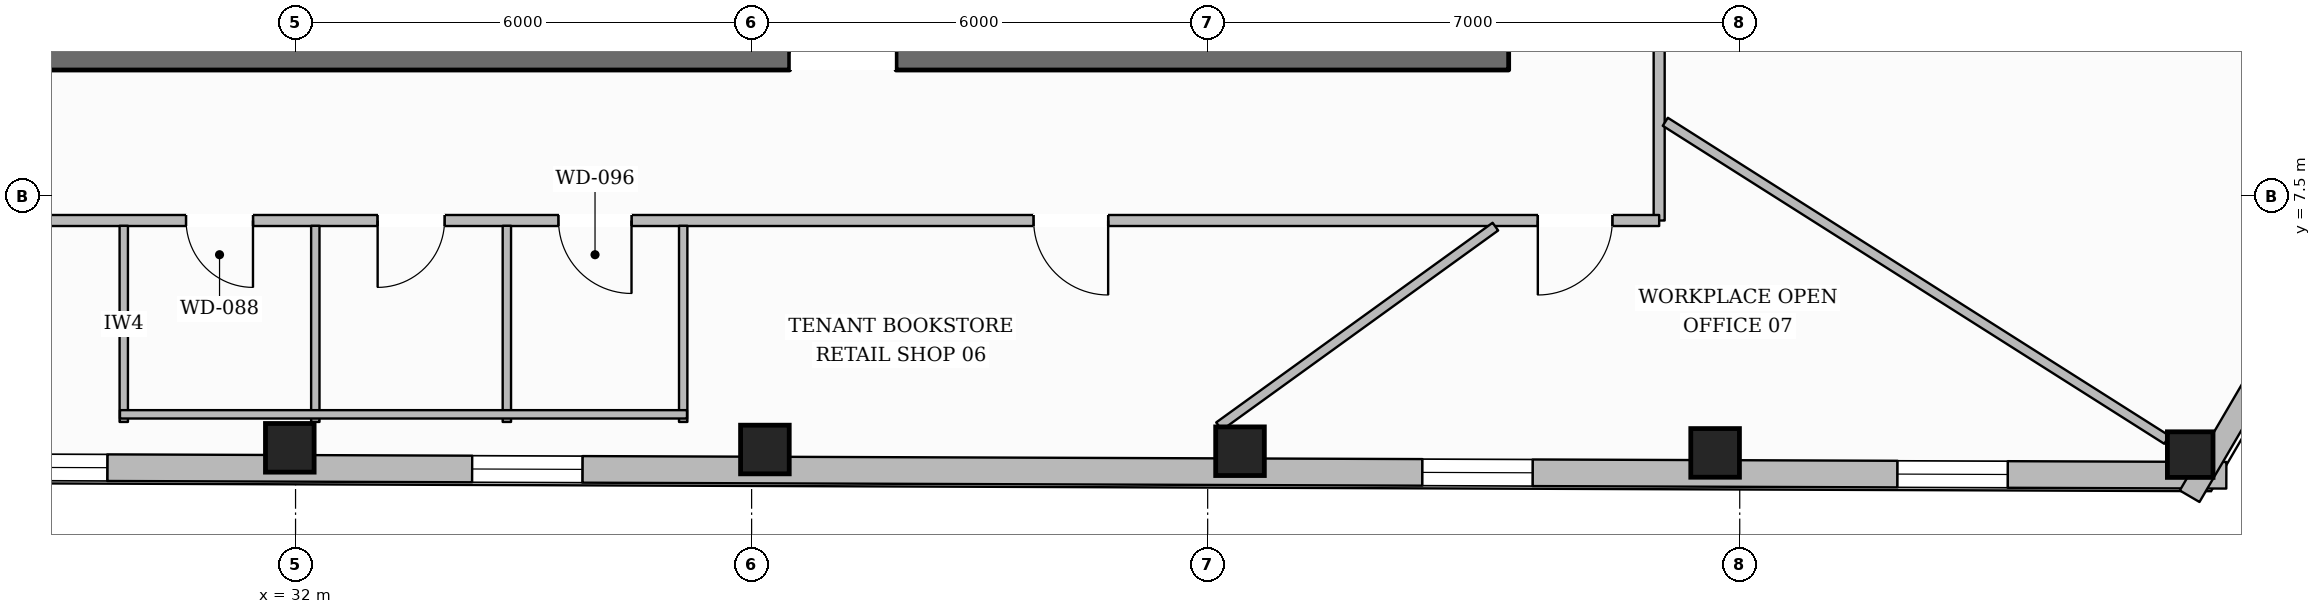
"""IFC4 building model, lengths in metres.
Left out: names, types, materials, properties, quantities, classifications, styles, units other than length and angle.
Written with IfcOpenShell. Run it as: python <this file> out.ifc"""

import sys

from ifc_helpers import new_model, si_unit, direction, frame, frame_2d, origin, origin_2d, place, context, subcontext, project, spatial, rectangle, hollow_rectangle, extrude, element, fill, save


model = new_model("IFC4")
c1 = context("Model", 3, precision=1e-05, world=origin(), true_north=direction((0.0, 1.0)))
c2 = subcontext(c1, "Body", "Model", "MODEL_VIEW")
j1 = project(units=[si_unit("LENGTHUNIT", "METRE"), si_unit("PLANEANGLEUNIT", "RADIAN")], contexts=[c1])
p1 = place(None, origin())
s1 = spatial("IfcSite", under=j1, at=p1, CompositionType="ELEMENT")
p2 = place(p1, origin())
s2 = spatial("IfcBuilding", under=s1, at=p2, CompositionType="ELEMENT")
p3 = place(p2, frame((0.0, 0.0, 199.65)))
s3 = spatial("IfcBuildingStorey", under=s2, at=p3, CompositionType="ELEMENT", Elevation=199.65)
p4 = place(p3, frame((28.04, 9.38, 0.0), z_axis=(0.0, 0.0, 1.0), x_axis=(1.0, 0.0, 0.0)))
e1 = element("IfcWall", 1, at=p4, inside=s3, PredefinedType="SOLIDWALL", context=c2, shape_type="SweptSolid", body=[
    extrude(rectangle(XDim=19.92, YDim=0.44, at=frame_2d((9.96, 0.0))), origin(), (0.0, 0.0, 1.0), 3.6),
])
p5 = place(p4, frame((10.46, 0.0, 0.0)))
e2 = element("IfcOpeningElement", 2, at=p5, cuts=e1, PredefinedType="OPENING", context=c2, shape_type="SweptSolid", body=[
    extrude(rectangle(XDim=1.4, YDim=2.2, at=frame_2d((0.7, 1.1))), frame((0.0, 0.23, 0.0), z_axis=(0.0, -1.0, 0.0), x_axis=(1.0, 0.0, 0.0)), (0.0, 0.0, 1.0), 0.46),
])
for number, where, z_axis, x_axis in (
    (3, (31.924, 4.189, 0.0), (0.0, 0.0, 1.0), (1.0, 0.0, 0.0)),
    (4, (38.175, 4.167, 0.0), (0.0, 0.0, 1.0), (1.0, 0.0, 0.0)),
    (5, (44.426, 4.145, 0.0), (0.0, 0.0, 1.0), (1.0, 0.0, 0.0)),
    (6, (50.676, 4.123, 0.0), (0.0, 0.0, 1.0), (1.0, 0.0, 0.0)),
):
    element("IfcColumn", number, at=place(p3, frame(where, z_axis=z_axis, x_axis=x_axis)), inside=s3, PredefinedType="COLUMN", context=c2, shape_type="SweptSolid", body=[
        extrude(hollow_rectangle(XDim=0.64, YDim=0.64, WallThickness=0.028, at=origin_2d()), origin(), (0.0, 0.0, 1.0), 3.6),
    ])
p6 = place(p3, frame((56.927, 4.1, 0.0), z_axis=(0.0, 0.0, 1.0), x_axis=(1.0, 0.0, 0.0)))
e7 = element("IfcColumn", 7, at=p6, inside=s3, PredefinedType="COLUMN", context=c2, shape_type="SweptSolid", body=[
    extrude(hollow_rectangle(XDim=0.6, YDim=0.6, WallThickness=0.028, at=origin_2d()), origin(), (0.0, 0.0, 1.0), 3.6),
])
p7 = place(p3, frame((57.402, 3.828, 0.0), z_axis=(0.0, 0.0, 1.0), x_axis=(-0.999993611248, 0.003574557642, 0.0)))
e8 = element("IfcWall", 8, at=p7, inside=s3, PredefinedType="STANDARD", context=c2, shape_type="SweptSolid", body=[
    extrude(rectangle(XDim=38.453, YDim=0.35, at=frame_2d((19.226, 0.0))), origin(), (0.0, 0.0, 1.0), 3.132),
])
p8 = place(p7, frame((34.129, 0.0, 0.65)))
e9 = element("IfcOpeningElement", 9, at=p8, cuts=e8, PredefinedType="OPENING", context=c2, shape_type="SweptSolid", body=[
    extrude(rectangle(XDim=1.45, YDim=1.75, at=frame_2d((0.725, 0.875))), frame((0.0, 0.185, 0.0), z_axis=(0.0, -1.0, 0.0), x_axis=(1.0, 0.0, 0.0)), (0.0, 0.0, 1.0), 0.37),
])
p9 = place(p7, frame((27.879, 0.0, 0.65)))
e10 = element("IfcOpeningElement", 10, at=p9, cuts=e8, PredefinedType="OPENING", context=c2, shape_type="SweptSolid", body=[
    extrude(rectangle(XDim=1.45, YDim=1.75, at=frame_2d((0.725, 0.875))), frame((0.0, 0.185, 0.0), z_axis=(0.0, -1.0, 0.0), x_axis=(1.0, 0.0, 0.0)), (0.0, 0.0, 1.0), 0.37),
])
p10 = place(p7, frame((21.628, 0.0, 0.65)))
e11 = element("IfcOpeningElement", 11, at=p10, cuts=e8, PredefinedType="OPENING", context=c2, shape_type="SweptSolid", body=[
    extrude(rectangle(XDim=1.45, YDim=1.75, at=frame_2d((0.725, 0.875))), frame((0.0, 0.185, 0.0), z_axis=(0.0, -1.0, 0.0), x_axis=(1.0, 0.0, 0.0)), (0.0, 0.0, 1.0), 0.37),
])
p11 = place(p7, frame((9.127, 0.0, 0.65)))
e12 = element("IfcOpeningElement", 12, at=p11, cuts=e8, PredefinedType="OPENING", context=c2, shape_type="SweptSolid", body=[
    extrude(rectangle(XDim=1.45, YDim=1.75, at=frame_2d((0.725, 0.875))), frame((0.0, 0.185, 0.0), z_axis=(0.0, -1.0, 0.0), x_axis=(1.0, 0.0, 0.0)), (0.0, 0.0, 1.0), 0.37),
])
p12 = place(p7, frame((2.877, 0.0, 0.65)))
e13 = element("IfcOpeningElement", 13, at=p12, cuts=e8, PredefinedType="OPENING", context=c2, shape_type="SweptSolid", body=[
    extrude(rectangle(XDim=1.45, YDim=1.75, at=frame_2d((0.725, 0.875))), frame((0.0, 0.185, 0.0), z_axis=(0.0, -1.0, 0.0), x_axis=(1.0, 0.0, 0.0)), (0.0, 0.0, 1.0), 0.37),
])
p13 = place(p3, frame((61.707, 11.735, 0.0), z_axis=(0.0, 0.0, 1.0), x_axis=(-0.504993005477, -0.863123435216, 0.0)))
e14 = element("IfcWall", 14, at=p13, inside=s3, PredefinedType="STANDARD", context=c2, shape_type="SweptSolid", body=[
    extrude(rectangle(XDim=9.48, YDim=0.3, at=frame_2d((4.74, 0.0))), origin(), (0.0, 0.0, 1.0), 3.132),
])
p14 = place(p13, frame((4.215, 0.0, 0.65)))
e15 = element("IfcOpeningElement", 15, at=p14, cuts=e14, PredefinedType="OPENING", context=c2, shape_type="SweptSolid", body=[
    extrude(rectangle(XDim=1.05, YDim=1.7, at=frame_2d((0.525, 0.85))), frame((0.0, 0.16, 0.0), z_axis=(0.0, -1.0, 0.0), x_axis=(1.0, 0.0, 0.0)), (0.0, 0.0, 1.0), 0.32),
])
p15 = place(p3, frame((49.94, 15.1, 0.0), z_axis=(0.0, 0.0, 1.0), x_axis=(0.0, -1.0, 0.0)))
e16 = element("IfcWall", 16, at=p15, inside=s3, PredefinedType="PARTITIONING", context=c2, shape_type="SweptSolid", body=[
    extrude(rectangle(XDim=7.92, YDim=0.145, at=frame_2d((3.96, 0.0))), origin(), (0.0, 0.0, 1.0), 3.6),
])
p16 = place(p15, frame((2.674, 0.0, 0.0)))
e17 = element("IfcOpeningElement", 17, at=p16, cuts=e16, PredefinedType="OPENING", context=c2, shape_type="SweptSolid", body=[
    extrude(rectangle(XDim=1.4, YDim=2.2, at=frame_2d((0.7, 1.1))), frame((0.0, 0.083, 0.0), z_axis=(0.0, -1.0, 0.0), x_axis=(1.0, 0.0, 0.0)), (0.0, 0.0, 1.0), 0.165),
])
p17 = place(p3, frame((49.94, 7.18, 0.0), z_axis=(0.0, 0.0, 1.0), x_axis=(-1.0, 0.0, 0.0)))
e18 = element("IfcWall", 18, at=p17, inside=s3, PredefinedType="PARTITIONING", context=c2, shape_type="SweptSolid", body=[
    extrude(rectangle(XDim=23.88, YDim=0.145, at=frame_2d((11.94, 0.0))), origin(), (0.0, 0.0, 1.0), 3.6),
])
p18 = place(p17, frame((18.5, 0.0, 0.0)))
e19 = element("IfcOpeningElement", 19, at=p18, cuts=e18, PredefinedType="OPENING", context=c2, shape_type="SweptSolid", body=[
    extrude(rectangle(XDim=0.88, YDim=2.1, at=frame_2d((0.44, 1.05))), frame((0.0, 0.083, 0.0), z_axis=(0.0, -1.0, 0.0), x_axis=(1.0, 0.0, 0.0)), (0.0, 0.0, 1.0), 0.165),
])
p19 = place(p17, frame((15.98, 0.0, 0.0)))
e20 = element("IfcOpeningElement", 20, at=p19, cuts=e18, PredefinedType="OPENING", context=c2, shape_type="SweptSolid", body=[
    extrude(rectangle(XDim=0.88, YDim=2.1, at=frame_2d((0.44, 1.05))), frame((0.0, 0.083, 0.0), z_axis=(0.0, -1.0, 0.0), x_axis=(1.0, 0.0, 0.0)), (0.0, 0.0, 1.0), 0.165),
])
p20 = place(p17, frame((13.52, 0.0, 0.0)))
e21 = element("IfcOpeningElement", 21, at=p20, cuts=e18, PredefinedType="OPENING", context=c2, shape_type="SweptSolid", body=[
    extrude(rectangle(XDim=0.96, YDim=2.1, at=frame_2d((0.48, 1.05))), frame((0.0, 0.083, 0.0), z_axis=(0.0, -1.0, 0.0), x_axis=(1.0, 0.0, 0.0)), (0.0, 0.0, 1.0), 0.165),
])
p21 = place(p17, frame((7.249, 0.0, 0.0)))
e22 = element("IfcOpeningElement", 22, at=p21, cuts=e18, PredefinedType="OPENING", context=c2, shape_type="SweptSolid", body=[
    extrude(rectangle(XDim=0.98, YDim=2.15, at=frame_2d((0.49, 1.075))), frame((0.0, 0.083, 0.0), z_axis=(0.0, -1.0, 0.0), x_axis=(1.0, 0.0, 0.0)), (0.0, 0.0, 1.0), 0.165),
])
p22 = place(p17, frame((0.616, 0.0, 0.0)))
e23 = element("IfcOpeningElement", 23, at=p22, cuts=e18, PredefinedType="OPENING", context=c2, shape_type="SweptSolid", body=[
    extrude(rectangle(XDim=0.98, YDim=2.15, at=frame_2d((0.49, 1.075))), frame((0.0, 0.083, 0.0), z_axis=(0.0, -1.0, 0.0), x_axis=(1.0, 0.0, 0.0)), (0.0, 0.0, 1.0), 0.165),
])
for number, where, z_axis, x_axis in (
    (24, (29.74, 4.53, 0.0), (0.0, 0.0, 1.0), (0.0, 1.0, 0.0)),
    (25, (32.26, 4.53, 0.0), (0.0, 0.0, 1.0), (0.0, 1.0, 0.0)),
    (26, (34.78, 4.53, 0.0), (0.0, 0.0, 1.0), (0.0, 1.0, 0.0)),
    (27, (37.1, 4.53, 0.0), (0.0, 0.0, 1.0), (0.0, 1.0, 0.0)),
):
    element("IfcWall", number, at=place(p3, frame(where, z_axis=z_axis, x_axis=x_axis)), inside=s3, PredefinedType="PLUMBINGWALL", context=c2, shape_type="SweptSolid", body=[
        extrude(rectangle(XDim=2.58, YDim=0.11, at=frame_2d((1.29, 0.0))), origin(), (0.0, 0.0, 1.0), 3.6),
    ])
p23 = place(p3, frame((29.69, 4.63, 0.0), z_axis=(0.0, 0.0, 1.0), x_axis=(1.0, 0.0, 0.0)))
e28 = element("IfcWall", 28, at=p23, inside=s3, PredefinedType="PLUMBINGWALL", context=c2, shape_type="SweptSolid", body=[
    extrude(rectangle(XDim=7.46, YDim=0.11, at=frame_2d((3.73, 0.0))), origin(), (0.0, 0.0, 1.0), 3.6),
])
p24 = place(p3, frame((50.021, 8.479, 0.0), z_axis=(0.0, 0.0, 1.0), x_axis=(0.844548219487, -0.535479509377, 0.0)))
e29 = element("IfcWall", 29, at=p24, inside=s3, PredefinedType="PARTITIONING", context=c2, shape_type="SweptSolid", body=[
    extrude(rectangle(XDim=7.812, YDim=0.125, at=frame_2d((3.906, 0.0))), origin(), (0.0, 0.0, 1.0), 3.141),
])
p25 = place(p3, frame((44.149, 4.473, 0.0), z_axis=(0.0, 0.0, 1.0), x_axis=(0.8106218177, 0.585570037373, 0.0)))
e30 = element("IfcWall", 30, at=p25, inside=s3, PredefinedType="PARTITIONING", context=c2, shape_type="SweptSolid", body=[
    extrude(rectangle(XDim=4.486, YDim=0.125, at=frame_2d((2.243, 0.0))), origin(), (0.0, 0.0, 1.0), 3.6),
])
p26 = place(p9, origin())
e31 = element("IfcWindow", 31, at=p26, inside=s3, PartitioningType="SINGLE_PANEL", PredefinedType="WINDOW", context=c2, shape_type="SweptSolid", body=[
    extrude(rectangle(XDim=1.45, YDim=1.75, at=frame_2d((0.725, 0.875))), frame((0.0, 0.03, 0.0), z_axis=(0.0, -1.0, 0.0), x_axis=(1.0, 0.0, 0.0)), (0.0, 0.0, 1.0), 0.06),
])
fill(e10, e31)
p27 = place(p10, origin())
e32 = element("IfcWindow", 32, at=p27, inside=s3, PartitioningType="SINGLE_PANEL", PredefinedType="WINDOW", context=c2, shape_type="SweptSolid", body=[
    extrude(rectangle(XDim=1.45, YDim=1.75, at=frame_2d((0.725, 0.875))), frame((0.0, 0.03, 0.0), z_axis=(0.0, -1.0, 0.0), x_axis=(1.0, 0.0, 0.0)), (0.0, 0.0, 1.0), 0.06),
])
fill(e11, e32)
p28 = place(p11, origin())
e33 = element("IfcWindow", 33, at=p28, inside=s3, PartitioningType="SINGLE_PANEL", PredefinedType="WINDOW", context=c2, shape_type="SweptSolid", body=[
    extrude(rectangle(XDim=1.45, YDim=1.75, at=frame_2d((0.725, 0.875))), frame((0.0, 0.03, 0.0), z_axis=(0.0, -1.0, 0.0), x_axis=(1.0, 0.0, 0.0)), (0.0, 0.0, 1.0), 0.06),
])
fill(e12, e33)
p29 = place(p12, origin())
e34 = element("IfcWindow", 34, at=p29, inside=s3, PartitioningType="SINGLE_PANEL", PredefinedType="WINDOW", context=c2, shape_type="SweptSolid", body=[
    extrude(rectangle(XDim=1.45, YDim=1.75, at=frame_2d((0.725, 0.875))), frame((0.0, 0.03, 0.0), z_axis=(0.0, -1.0, 0.0), x_axis=(1.0, 0.0, 0.0)), (0.0, 0.0, 1.0), 0.06),
])
fill(e13, e34)
p30 = place(p5, origin())
e35 = element("IfcDoor", 35, at=p30, inside=s3, OperationType="SINGLE_SWING_LEFT", PredefinedType="DOOR", context=c2, shape_type="SweptSolid", body=[
    extrude(rectangle(XDim=1.4, YDim=2.2, at=frame_2d((0.7, 1.1))), frame((0.0, 0.025, 0.0), z_axis=(0.0, -1.0, 0.0), x_axis=(1.0, 0.0, 0.0)), (0.0, 0.0, 1.0), 0.05),
])
fill(e2, e35)
p31 = place(p18, origin())
e36 = element("IfcDoor", 36, at=p31, inside=s3, OperationType="SINGLE_SWING_LEFT", PredefinedType="DOOR", context=c2, shape_type="SweptSolid", body=[
    extrude(rectangle(XDim=0.88, YDim=2.1, at=frame_2d((0.44, 1.05))), frame((0.0, 0.025, 0.0), z_axis=(0.0, -1.0, 0.0), x_axis=(1.0, 0.0, 0.0)), (0.0, 0.0, 1.0), 0.05),
])
fill(e19, e36)
p32 = place(p19, origin())
e37 = element("IfcDoor", 37, at=p32, inside=s3, OperationType="SINGLE_SWING_RIGHT", PredefinedType="DOOR", context=c2, shape_type="SweptSolid", body=[
    extrude(rectangle(XDim=0.88, YDim=2.1, at=frame_2d((0.44, 1.05))), frame((0.0, 0.025, 0.0), z_axis=(0.0, -1.0, 0.0), x_axis=(1.0, 0.0, 0.0)), (0.0, 0.0, 1.0), 0.05),
])
fill(e20, e37)
p33 = place(p20, origin())
e38 = element("IfcDoor", 38, at=p33, inside=s3, OperationType="SINGLE_SWING_LEFT", PredefinedType="DOOR", context=c2, shape_type="SweptSolid", body=[
    extrude(rectangle(XDim=0.96, YDim=2.1, at=frame_2d((0.48, 1.05))), frame((0.0, 0.025, 0.0), z_axis=(0.0, -1.0, 0.0), x_axis=(1.0, 0.0, 0.0)), (0.0, 0.0, 1.0), 0.05),
])
fill(e21, e38)
p34 = place(p21, origin())
e39 = element("IfcDoor", 39, at=p34, inside=s3, OperationType="SINGLE_SWING_LEFT", PredefinedType="DOOR", context=c2, shape_type="SweptSolid", body=[
    extrude(rectangle(XDim=0.98, YDim=2.15, at=frame_2d((0.49, 1.075))), frame((0.0, 0.025, 0.0), z_axis=(0.0, -1.0, 0.0), x_axis=(1.0, 0.0, 0.0)), (0.0, 0.0, 1.0), 0.05),
])
fill(e22, e39)
p35 = place(p22, origin())
e40 = element("IfcDoor", 40, at=p35, inside=s3, OperationType="SINGLE_SWING_RIGHT", PredefinedType="DOOR", context=c2, shape_type="SweptSolid", body=[
    extrude(rectangle(XDim=0.98, YDim=2.15, at=frame_2d((0.49, 1.075))), frame((0.0, 0.025, 0.0), z_axis=(0.0, -1.0, 0.0), x_axis=(1.0, 0.0, 0.0)), (0.0, 0.0, 1.0), 0.05),
])
fill(e23, e40)
save(model, sys.argv[1])
